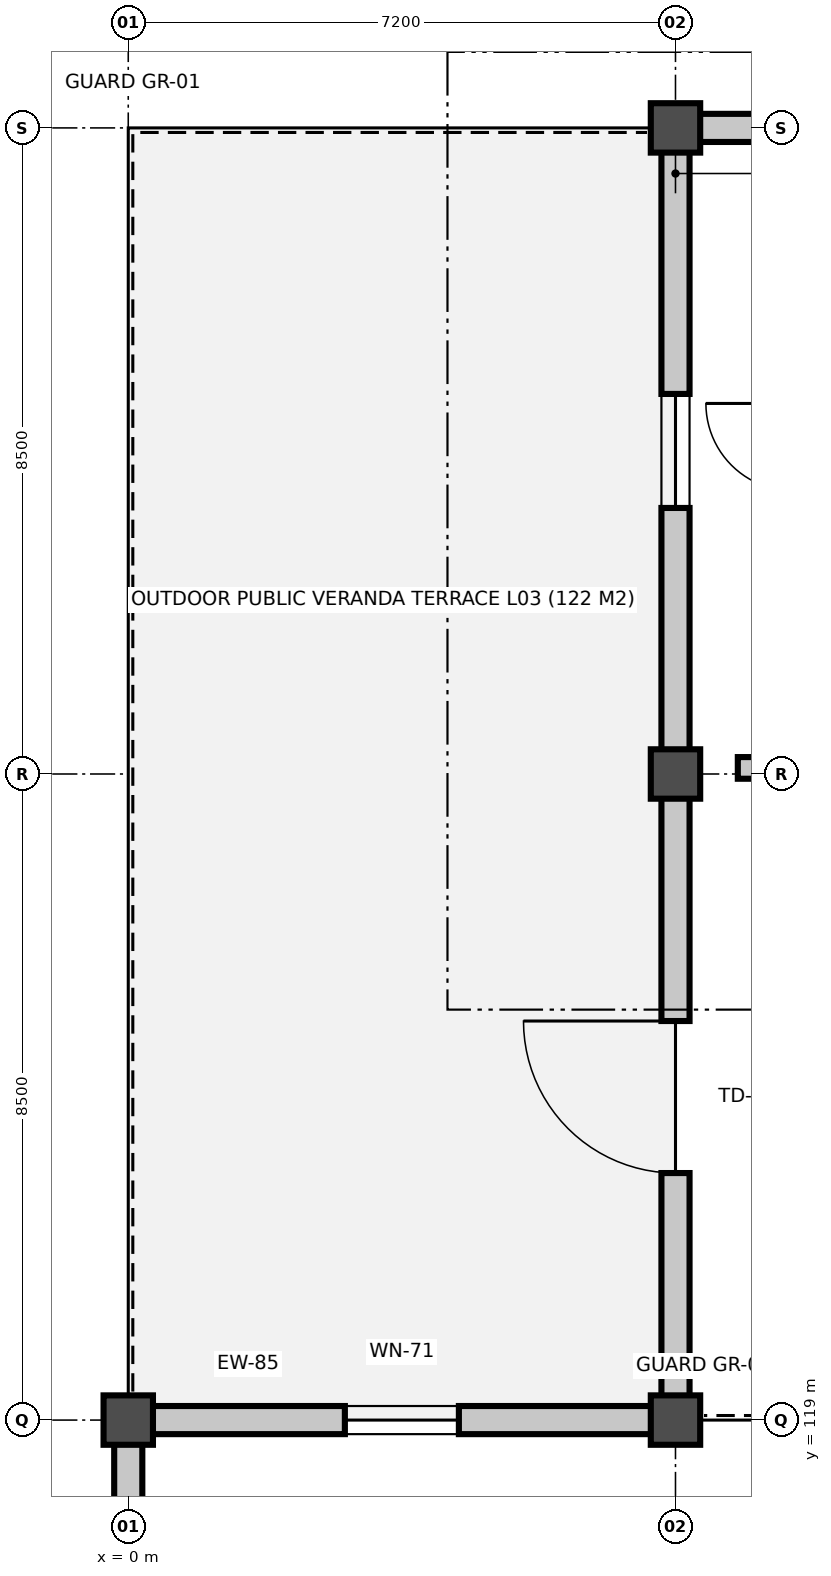
"""IFC4 building model, lengths in metres.
Left out: names, types, materials, properties, quantities, classifications, styles, units other than length and angle.
Written with IfcOpenShell. Run it as: python <this file> out.ifc"""

import sys

from ifc_helpers import new_model, si_unit, direction, frame, frame_2d, origin, origin_2d, place, context, subcontext, project, spatial, rectangle, extrude, element, fill, save


model = new_model("IFC4")
c1 = context("Model", 3, precision=1e-05, world=origin(), true_north=direction((0.0, 1.0)))
c2 = subcontext(c1, "Body", "Model", "MODEL_VIEW")
j1 = project(units=[si_unit("LENGTHUNIT", "METRE"), si_unit("PLANEANGLEUNIT", "RADIAN")], contexts=[c1])
p1 = place(None, origin())
s1 = spatial("IfcSite", under=j1, at=p1, CompositionType="ELEMENT")
p2 = place(p1, origin())
s2 = spatial("IfcBuilding", under=s1, at=p2, CompositionType="ELEMENT")
p3 = place(p2, frame((0.0, 0.0, 15.0)))
s3 = spatial("IfcBuildingStorey", under=s2, at=p3, CompositionType="ELEMENT", Elevation=15.0)
for number, where, z_axis, x_axis in (
    (1, (0.0, 119.0, 0.0), (0.0, 0.0, 1.0), (1.0, 0.0, 0.0)),
    (2, (7.2, 119.0, 0.0), (0.0, 0.0, 1.0), (1.0, 0.0, 0.0)),
    (3, (7.2, 127.5, 0.0), (0.0, 0.0, 1.0), (1.0, 0.0, 0.0)),
    (4, (7.2, 136.0, 0.0), (0.0, 0.0, 1.0), (1.0, 0.0, 0.0)),
):
    element("IfcColumn", number, at=place(p3, frame(where, z_axis=z_axis, x_axis=x_axis)), inside=s3, PredefinedType="COLUMN", context=c2, shape_type="SweptSolid", body=[
        extrude(rectangle(XDim=0.65, YDim=0.65, at=origin_2d()), origin(), (0.0, 0.0, 1.0), 4.5),
    ])
p4 = place(p3, frame((0.305, 119.0, -0.249), z_axis=(0.0, 0.0, 1.0), x_axis=(1.0, 0.0, 0.0)))
e5 = element("IfcWall", 5, at=p4, inside=s3, PredefinedType="SOLIDWALL", context=c2, shape_type="SweptSolid", body=[
    extrude(rectangle(XDim=6.59, YDim=0.37, at=frame_2d((3.295, 0.0))), origin(), (0.0, 0.0, 1.0), 3.534),
])
p5 = place(p4, frame((2.545, 0.0, 1.0)))
e6 = element("IfcOpeningElement", 6, at=p5, cuts=e5, PredefinedType="OPENING", context=c2, shape_type="SweptSolid", body=[
    extrude(rectangle(XDim=1.5, YDim=1.95, at=frame_2d((0.75, 0.975))), frame((0.0, 0.195, 0.0), z_axis=(0.0, -1.0, 0.0), x_axis=(1.0, 0.0, 0.0)), (0.0, 0.0, 1.0), 0.39),
])
p6 = place(p3, frame((7.2, 119.305, 0.0), z_axis=(0.0, 0.0, 1.0), x_axis=(0.0, 1.0, 0.0)))
e7 = element("IfcWall", 7, at=p6, inside=s3, PredefinedType="SOLIDWALL", context=c2, shape_type="SweptSolid", body=[
    extrude(rectangle(XDim=7.89, YDim=0.37, at=frame_2d((3.945, 0.0))), origin(), (0.0, 0.0, 1.0), 3.536),
])
p7 = place(p6, frame((2.945, 0.0, 0.0)))
e8 = element("IfcOpeningElement", 8, at=p7, cuts=e7, PredefinedType="OPENING", context=c2, shape_type="SweptSolid", body=[
    extrude(rectangle(XDim=2.0, YDim=2.42, at=frame_2d((1.0, 1.21))), frame((0.0, 0.195, 0.0), z_axis=(0.0, -1.0, 0.0), x_axis=(1.0, 0.0, 0.0)), (0.0, 0.0, 1.0), 0.39),
])
p8 = place(p3, frame((7.2, 127.805, 0.0), z_axis=(0.0, 0.0, 1.0), x_axis=(0.0, 1.0, 0.0)))
e9 = element("IfcWall", 9, at=p8, inside=s3, PredefinedType="SOLIDWALL", context=c2, shape_type="SweptSolid", body=[
    extrude(rectangle(XDim=7.89, YDim=0.37, at=frame_2d((3.945, 0.0))), origin(), (0.0, 0.0, 1.0), 3.595),
])
p9 = place(p8, frame((3.195, 0.0, 1.0)))
e10 = element("IfcOpeningElement", 10, at=p9, cuts=e9, PredefinedType="OPENING", context=c2, shape_type="SweptSolid", body=[
    extrude(rectangle(XDim=1.5, YDim=1.95, at=frame_2d((0.75, 0.975))), frame((0.0, 0.195, 0.0), z_axis=(0.0, -1.0, 0.0), x_axis=(1.0, 0.0, 0.0)), (0.0, 0.0, 1.0), 0.39),
])
p10 = place(p3, frame((7.505, 136.0, 0.0), z_axis=(0.0, 0.0, 1.0), x_axis=(1.0, 0.0, 0.0)))
e11 = element("IfcWall", 11, at=p10, inside=s3, PredefinedType="SOLIDWALL", context=c2, shape_type="SweptSolid", body=[
    extrude(rectangle(XDim=7.79, YDim=0.37, at=frame_2d((3.895, 0.0))), origin(), (0.0, 0.0, 1.0), 3.244),
])
p11 = place(p10, frame((3.145, 0.0, 1.0)))
e12 = element("IfcOpeningElement", 12, at=p11, cuts=e11, PredefinedType="OPENING", context=c2, shape_type="SweptSolid", body=[
    extrude(rectangle(XDim=1.5, YDim=1.95, at=frame_2d((0.75, 0.975))), frame((0.0, 0.195, 0.0), z_axis=(0.0, -1.0, 0.0), x_axis=(1.0, 0.0, 0.0)), (0.0, 0.0, 1.0), 0.39),
])
p12 = place(p3, frame((0.0, 110.805, -0.273), z_axis=(0.0, 0.0, 1.0), x_axis=(0.0, 1.0, 0.0)))
e13 = element("IfcWall", 13, at=p12, inside=s3, PredefinedType="SOLIDWALL", context=c2, shape_type="SweptSolid", body=[
    extrude(rectangle(XDim=7.89, YDim=0.37, at=frame_2d((3.945, 0.0))), origin(), (0.0, 0.0, 1.0), 3.441),
])
p13 = place(p12, frame((3.42, 0.0, 0.95)))
e14 = element("IfcOpeningElement", 14, at=p13, cuts=e13, PredefinedType="OPENING", context=c2, shape_type="SweptSolid", body=[
    extrude(rectangle(XDim=1.05, YDim=1.8, at=frame_2d((0.525, 0.9))), frame((0.0, 0.195, 0.0), z_axis=(0.0, -1.0, 0.0), x_axis=(1.0, 0.0, 0.0)), (0.0, 0.0, 1.0), 0.39),
])
p14 = place(p3, frame((8.02, 127.58, 0.0), z_axis=(0.0, 0.0, 1.0), x_axis=(1.0, 0.0, 0.0)))
e15 = element("IfcWall", 15, at=p14, inside=s3, PredefinedType="PARTITIONING", context=c2, shape_type="SweptSolid", body=[
    extrude(rectangle(XDim=7.005, YDim=0.285, at=frame_2d((3.502, 0.0))), origin(), (0.0, 0.0, 1.0), 3.118),
])
p15 = place(p5, origin())
e16 = element("IfcWindow", 16, at=p15, inside=s3, PartitioningType="SINGLE_PANEL", PredefinedType="WINDOW", context=c2, shape_type="SweptSolid", body=[
    extrude(rectangle(XDim=1.5, YDim=1.95, at=frame_2d((0.75, 0.975))), frame((0.0, 0.03, 0.0), z_axis=(0.0, -1.0, 0.0), x_axis=(1.0, 0.0, 0.0)), (0.0, 0.0, 1.0), 0.06),
])
fill(e6, e16)
p16 = place(p7, origin())
e17 = element("IfcDoor", 17, at=p16, inside=s3, OperationType="SINGLE_SWING_RIGHT", PredefinedType="DOOR", context=c2, shape_type="SweptSolid", body=[
    extrude(rectangle(XDim=2.0, YDim=2.42, at=frame_2d((1.0, 1.21))), frame((0.0, 0.025, 0.0), z_axis=(0.0, -1.0, 0.0), x_axis=(1.0, 0.0, 0.0)), (0.0, 0.0, 1.0), 0.05),
])
fill(e8, e17)
p17 = place(p9, origin())
e18 = element("IfcWindow", 18, at=p17, inside=s3, PartitioningType="SINGLE_PANEL", PredefinedType="WINDOW", context=c2, shape_type="SweptSolid", body=[
    extrude(rectangle(XDim=1.5, YDim=1.95, at=frame_2d((0.75, 0.975))), frame((0.0, 0.03, 0.0), z_axis=(0.0, -1.0, 0.0), x_axis=(1.0, 0.0, 0.0)), (0.0, 0.0, 1.0), 0.06),
])
fill(e10, e18)
save(model, sys.argv[1])
